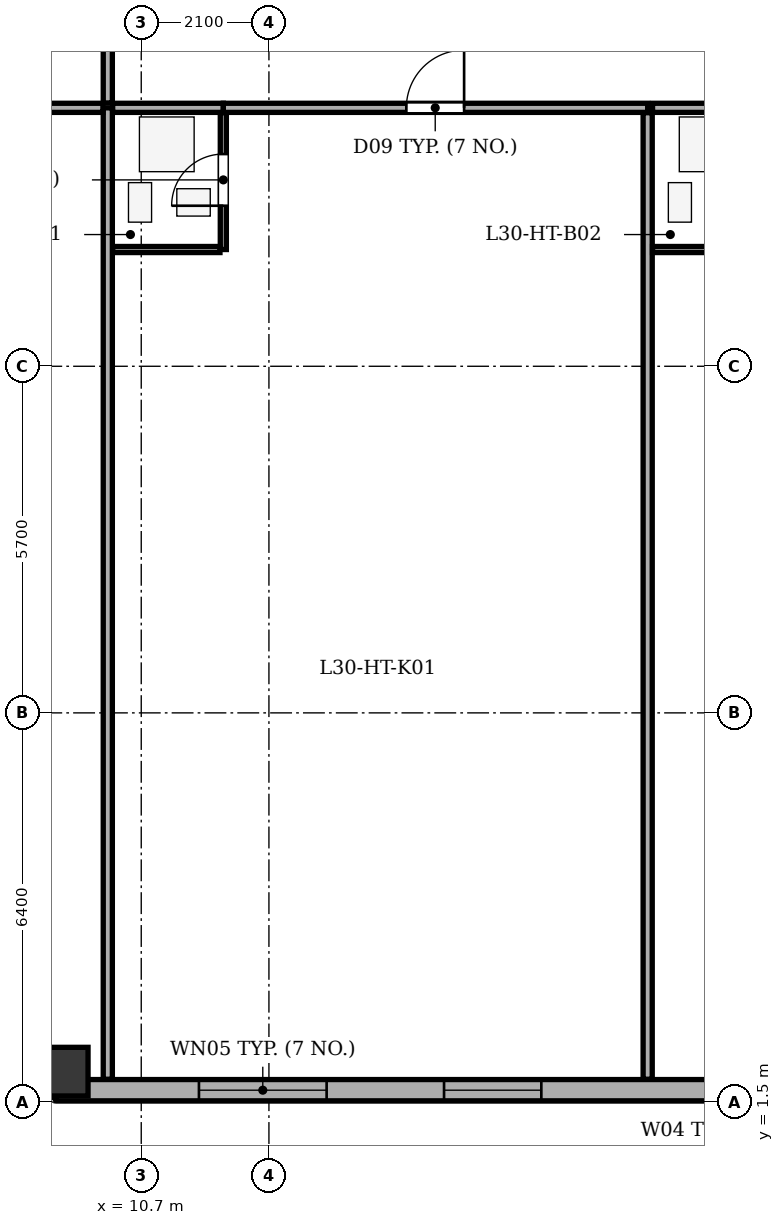
"""IFC4 building model, lengths in metres.
Left out: names, types, materials, properties, quantities, classifications, styles, units other than length and angle.
Written with IfcOpenShell. Run it as: python <this file> out.ifc"""

import sys

from ifc_helpers import new_model, si_unit, direction, frame, frame_2d, origin, origin_2d, place, context, subcontext, project, spatial, rectangle, extrude, element, fill, save


model = new_model("IFC4")
c1 = context("Model", 3, precision=1e-05, world=origin(), true_north=direction((0.0, 1.0)))
c2 = subcontext(c1, "Body", "Model", "MODEL_VIEW")
j1 = project(units=[si_unit("LENGTHUNIT", "METRE"), si_unit("PLANEANGLEUNIT", "RADIAN")], contexts=[c1])
p1 = place(None, origin())
s1 = spatial("IfcSite", under=j1, at=p1, CompositionType="ELEMENT")
p2 = place(p1, origin())
s2 = spatial("IfcBuilding", under=s1, at=p2, CompositionType="ELEMENT")
p3 = place(p2, frame((0.0, 0.0, 123.8)))
s3 = spatial("IfcBuildingStorey", under=s2, at=p3, CompositionType="ELEMENT", Elevation=123.8)
p4 = place(p3, frame((9.3, 2.0, 0.0), z_axis=(0.0, 0.0, 1.0), x_axis=(1.0, 0.0, 0.0)))
e1 = element("IfcColumn", 1, at=p4, inside=s3, PredefinedType="COLUMN", context=c2, shape_type="SweptSolid", body=[
    extrude(rectangle(XDim=0.8, YDim=1.05, at=origin_2d()), origin(), (0.0, 0.0, 1.0), 3.5),
])
p5 = place(p3, frame((44.3, 1.695, 0.0), z_axis=(0.0, 0.0, 1.0), x_axis=(-1.0, 0.0, 0.0)))
e2 = element("IfcWall", 2, at=p5, inside=s3, PredefinedType="STANDARD", context=c2, shape_type="SweptSolid", body=[
    extrude(rectangle(XDim=35.0, YDim=0.35, at=frame_2d((17.5, 0.0))), origin(), (0.0, 0.0, 1.0), 2.785),
])
p6 = place(p5, frame((19.6, 0.0, 0.0)))
e3 = element("IfcOpeningElement", 3, at=p6, cuts=e2, PredefinedType="OPENING", context=c2, shape_type="SweptSolid", body=[
    extrude(rectangle(XDim=1.0, YDim=2.02, at=frame_2d((0.5, 1.01))), frame((0.0, 0.185, 0.0), z_axis=(0.0, -1.0, 0.0), x_axis=(1.0, 0.0, 0.0)), (0.0, 0.0, 1.0), 0.37),
])
p7 = place(p5, frame((1.508, 0.0, 0.75)))
e4 = element("IfcOpeningElement", 4, at=p7, cuts=e2, PredefinedType="OPENING", context=c2, shape_type="SweptSolid", body=[
    extrude(rectangle(XDim=1.6, YDim=1.75, at=frame_2d((0.8, 0.875))), frame((0.0, 0.185, 0.0), z_axis=(0.0, -1.0, 0.0), x_axis=(1.0, 0.0, 0.0)), (0.0, 0.0, 1.0), 0.37),
])
p8 = place(p5, frame((4.338, 0.0, 0.75)))
e5 = element("IfcOpeningElement", 5, at=p8, cuts=e2, PredefinedType="OPENING", context=c2, shape_type="SweptSolid", body=[
    extrude(rectangle(XDim=1.6, YDim=1.75, at=frame_2d((0.8, 0.875))), frame((0.0, 0.185, 0.0), z_axis=(0.0, -1.0, 0.0), x_axis=(1.0, 0.0, 0.0)), (0.0, 0.0, 1.0), 0.37),
])
p9 = place(p5, frame((10.406, 0.0, 0.75)))
e6 = element("IfcOpeningElement", 6, at=p9, cuts=e2, PredefinedType="OPENING", context=c2, shape_type="SweptSolid", body=[
    extrude(rectangle(XDim=1.6, YDim=1.75, at=frame_2d((0.8, 0.875))), frame((0.0, 0.185, 0.0), z_axis=(0.0, -1.0, 0.0), x_axis=(1.0, 0.0, 0.0)), (0.0, 0.0, 1.0), 0.37),
])
p10 = place(p5, frame((13.003, 0.0, 0.75)))
e7 = element("IfcOpeningElement", 7, at=p10, cuts=e2, PredefinedType="OPENING", context=c2, shape_type="SweptSolid", body=[
    extrude(rectangle(XDim=1.6, YDim=1.75, at=frame_2d((0.8, 0.875))), frame((0.0, 0.185, 0.0), z_axis=(0.0, -1.0, 0.0), x_axis=(1.0, 0.0, 0.0)), (0.0, 0.0, 1.0), 0.37),
])
p11 = place(p5, frame((27.02, 0.0, 0.75)))
e8 = element("IfcOpeningElement", 8, at=p11, cuts=e2, PredefinedType="OPENING", context=c2, shape_type="SweptSolid", body=[
    extrude(rectangle(XDim=1.6, YDim=1.75, at=frame_2d((0.8, 0.875))), frame((0.0, 0.185, 0.0), z_axis=(0.0, -1.0, 0.0), x_axis=(1.0, 0.0, 0.0)), (0.0, 0.0, 1.0), 0.37),
])
p12 = place(p5, frame((30.551, 0.0, 0.75)))
e9 = element("IfcOpeningElement", 9, at=p12, cuts=e2, PredefinedType="OPENING", context=c2, shape_type="SweptSolid", body=[
    extrude(rectangle(XDim=2.1, YDim=1.75, at=frame_2d((1.05, 0.875))), frame((0.0, 0.185, 0.0), z_axis=(0.0, -1.0, 0.0), x_axis=(1.0, 0.0, 0.0)), (0.0, 0.0, 1.0), 0.37),
])
p13 = place(p3, frame((9.3, 1.695, 0.0), z_axis=(0.0, 0.0, 1.0), x_axis=(-0.707106781187, 0.707106781187, 0.0)))
e10 = element("IfcWall", 10, at=p13, inside=s3, PredefinedType="STANDARD", context=c2, shape_type="SweptSolid", body=[
    extrude(rectangle(XDim=6.795, YDim=0.35, at=frame_2d((3.397, 0.0))), origin(), (0.0, 0.0, 1.0), 2.785),
])
p14 = place(p13, frame((2.698, 0.0, 0.75)))
e11 = element("IfcOpeningElement", 11, at=p14, cuts=e10, PredefinedType="OPENING", context=c2, shape_type="SweptSolid", body=[
    extrude(rectangle(XDim=1.4, YDim=1.65, at=frame_2d((0.7, 0.825))), frame((0.0, 0.185, 0.0), z_axis=(0.0, -1.0, 0.0), x_axis=(1.0, 0.0, 0.0)), (0.0, 0.0, 1.0), 0.37),
])
p15 = place(p3, frame((10.15, 1.875, 0.0), z_axis=(0.0, 0.0, 1.0), x_axis=(0.0, 1.0, 0.0)))
e12 = element("IfcWall", 12, at=p15, inside=s3, PredefinedType="PARTITIONING", context=c2, shape_type="SweptSolid", body=[
    extrude(rectangle(XDim=15.975, YDim=0.15, at=frame_2d((7.988, 0.0))), origin(), (0.0, 0.0, 1.0), 3.2),
])
p16 = place(p3, frame((10.23, 17.85, 0.0), z_axis=(0.0, 0.0, 1.0), x_axis=(1.0, 0.0, 0.0)))
e13 = element("IfcWall", 13, at=p16, inside=s3, PredefinedType="PARTITIONING", context=c2, shape_type="SweptSolid", body=[
    extrude(rectangle(XDim=1.82, YDim=0.15, at=frame_2d((0.91, 0.0))), origin(), (0.0, 0.0, 1.0), 3.2),
])
p17 = place(p3, frame((12.05, 17.85, 0.0), z_axis=(0.0, 0.0, 1.0), x_axis=(1.0, 0.0, 0.0)))
e14 = element("IfcWall", 14, at=p17, inside=s3, PredefinedType="PARTITIONING", context=c2, shape_type="SweptSolid", body=[
    extrude(rectangle(XDim=6.979, YDim=0.15, at=frame_2d((3.49, 0.0))), origin(), (0.0, 0.0, 1.0), 3.2),
])
p18 = place(p17, frame((3.01, 0.0, 0.0)))
e15 = element("IfcOpeningElement", 15, at=p18, cuts=e14, PredefinedType="OPENING", context=c2, shape_type="SweptSolid", body=[
    extrude(rectangle(XDim=0.95, YDim=2.1, at=frame_2d((0.475, 1.05))), frame((0.0, 0.085, 0.0), z_axis=(0.0, -1.0, 0.0), x_axis=(1.0, 0.0, 0.0)), (0.0, 0.0, 1.0), 0.17),
])
p19 = place(p3, frame((12.05, 15.52, 0.0), z_axis=(0.0, 0.0, 1.0), x_axis=(0.0, 1.0, 0.0)))
e16 = element("IfcWall", 16, at=p19, inside=s3, PredefinedType="PARTITIONING", context=c2, shape_type="SweptSolid", body=[
    extrude(rectangle(XDim=2.25, YDim=0.1, at=frame_2d((1.125, 0.0))), origin(), (0.0, 0.0, 1.0), 3.2),
])
p20 = place(p19, frame((0.72, 0.0, 0.0)))
e17 = element("IfcOpeningElement", 17, at=p20, cuts=e16, PredefinedType="OPENING", context=c2, shape_type="SweptSolid", body=[
    extrude(rectangle(XDim=0.85, YDim=2.05, at=frame_2d((0.425, 1.025))), frame((0.0, 0.06, 0.0), z_axis=(0.0, -1.0, 0.0), x_axis=(1.0, 0.0, 0.0)), (0.0, 0.0, 1.0), 0.12),
])
p21 = place(p3, frame((10.23, 15.52, 0.0), z_axis=(0.0, 0.0, 1.0), x_axis=(1.0, 0.0, 0.0)))
e18 = element("IfcWall", 18, at=p21, inside=s3, PredefinedType="PARTITIONING", context=c2, shape_type="SweptSolid", body=[
    extrude(rectangle(XDim=1.765, YDim=0.1, at=frame_2d((0.883, 0.0))), origin(), (0.0, 0.0, 1.0), 3.2),
])
p22 = place(p3, frame((19.029, 1.875, 0.0), z_axis=(0.0, 0.0, 1.0), x_axis=(0.0, 1.0, 0.0)))
e19 = element("IfcWall", 19, at=p22, inside=s3, PredefinedType="PARTITIONING", context=c2, shape_type="SweptSolid", body=[
    extrude(rectangle(XDim=15.895, YDim=0.15, at=frame_2d((7.948, 0.0))), origin(), (0.0, 0.0, 1.0), 3.2),
])
p23 = place(p3, frame((19.109, 17.85, 0.0), z_axis=(0.0, 0.0, 1.0), x_axis=(1.0, 0.0, 0.0)))
e20 = element("IfcWall", 20, at=p23, inside=s3, PredefinedType="PARTITIONING", context=c2, shape_type="SweptSolid", body=[
    extrude(rectangle(XDim=1.82, YDim=0.15, at=frame_2d((0.91, 0.0))), origin(), (0.0, 0.0, 1.0), 3.2),
])
p24 = place(p3, frame((19.109, 15.52, 0.0), z_axis=(0.0, 0.0, 1.0), x_axis=(1.0, 0.0, 0.0)))
e21 = element("IfcWall", 21, at=p24, inside=s3, PredefinedType="PARTITIONING", context=c2, shape_type="SweptSolid", body=[
    extrude(rectangle(XDim=1.765, YDim=0.1, at=frame_2d((0.883, 0.0))), origin(), (0.0, 0.0, 1.0), 3.2),
])
p25 = place(p3, frame((4.675, 17.85, 0.0), z_axis=(0.0, 0.0, 1.0), x_axis=(1.0, 0.0, 0.0)))
e22 = element("IfcWall", 22, at=p25, inside=s3, PredefinedType="PARTITIONING", context=c2, shape_type="SweptSolid", body=[
    extrude(rectangle(XDim=5.395, YDim=0.15, at=frame_2d((2.698, 0.0))), origin(), (0.0, 0.0, 1.0), 3.2),
])
p26 = place(p3, frame((10.15, 17.93, 0.0), z_axis=(0.0, 0.0, 1.0), x_axis=(0.0, 1.0, 0.0)))
e23 = element("IfcWall", 23, at=p26, inside=s3, PredefinedType="PARTITIONING", context=c2, shape_type="SweptSolid", body=[
    extrude(rectangle(XDim=18.54, YDim=0.15, at=frame_2d((9.27, 0.0))), origin(), (0.0, 0.0, 1.0), 3.2),
])
p27 = place(p26, frame((8.79, 0.0, 0.0)))
e24 = element("IfcOpeningElement", 24, at=p27, cuts=e23, PredefinedType="OPENING", context=c2, shape_type="SweptSolid", body=[
    extrude(rectangle(XDim=0.95, YDim=2.1, at=frame_2d((0.475, 1.05))), frame((0.0, 0.085, 0.0), z_axis=(0.0, -1.0, 0.0), x_axis=(1.0, 0.0, 0.0)), (0.0, 0.0, 1.0), 0.17),
])
p28 = place(p11, origin())
e25 = element("IfcWindow", 25, at=p28, inside=s3, PartitioningType="SINGLE_PANEL", PredefinedType="WINDOW", context=c2, shape_type="SweptSolid", body=[
    extrude(rectangle(XDim=1.6, YDim=1.75, at=frame_2d((0.8, 0.875))), frame((0.0, -0.01, 0.0), z_axis=(0.0, -1.0, 0.0), x_axis=(1.0, 0.0, 0.0)), (0.0, 0.0, 1.0), 0.06),
])
fill(e8, e25)
p29 = place(p12, origin())
e26 = element("IfcWindow", 26, at=p29, inside=s3, PartitioningType="SINGLE_PANEL", PredefinedType="WINDOW", context=c2, shape_type="SweptSolid", body=[
    extrude(rectangle(XDim=2.1, YDim=1.75, at=frame_2d((1.05, 0.875))), frame((0.0, -0.01, 0.0), z_axis=(0.0, -1.0, 0.0), x_axis=(1.0, 0.0, 0.0)), (0.0, 0.0, 1.0), 0.06),
])
fill(e9, e26)
p30 = place(p20, origin())
e27 = element("IfcDoor", 27, at=p30, inside=s3, OperationType="SINGLE_SWING_LEFT", PredefinedType="DOOR", context=c2, shape_type="SweptSolid", body=[
    extrude(rectangle(XDim=0.85, YDim=2.05, at=frame_2d((0.425, 1.025))), frame((0.0, 0.025, 0.0), z_axis=(0.0, -1.0, 0.0), x_axis=(1.0, 0.0, 0.0)), (0.0, 0.0, 1.0), 0.05),
])
fill(e17, e27)
p31 = place(p18, origin())
e28 = element("IfcDoor", 28, at=p31, inside=s3, OperationType="SINGLE_SWING_RIGHT", PredefinedType="DOOR", context=c2, shape_type="SweptSolid", body=[
    extrude(rectangle(XDim=0.95, YDim=2.1, at=frame_2d((0.475, 1.05))), frame((0.0, 0.025, 0.0), z_axis=(0.0, -1.0, 0.0), x_axis=(1.0, 0.0, 0.0)), (0.0, 0.0, 1.0), 0.05),
])
fill(e15, e28)
save(model, sys.argv[1])
